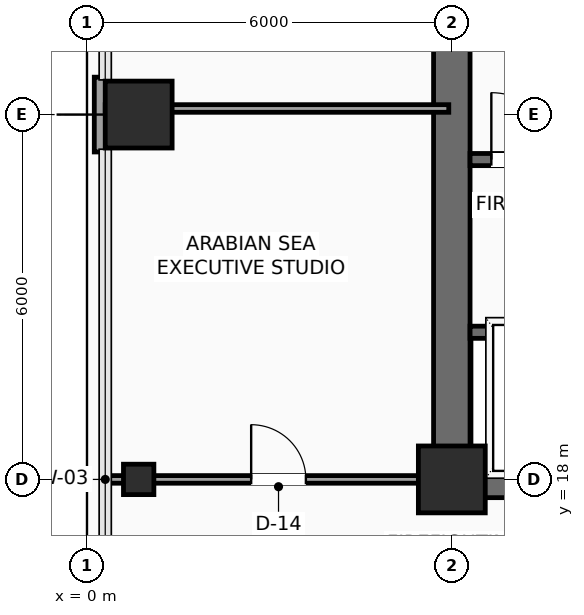
"""IFC4 building model, lengths in metres.
Left out: names, types, materials, properties, quantities, classifications, styles, units other than length and angle.
Written with IfcOpenShell. Run it as: python <this file> out.ifc"""

import sys

from ifc_helpers import new_model, si_unit, direction, frame, frame_2d, origin, origin_2d, place, context, subcontext, project, spatial, rectangle, hollow_rectangle, extrude, element, fill, save


model = new_model("IFC4")
c1 = context("Model", 3, precision=1e-05, world=origin(), true_north=direction((0.0, 1.0)))
c2 = subcontext(c1, "Body", "Model", "MODEL_VIEW")
j1 = project(units=[si_unit("LENGTHUNIT", "METRE"), si_unit("PLANEANGLEUNIT", "RADIAN")], contexts=[c1])
p1 = place(None, origin())
s1 = spatial("IfcSite", under=j1, at=p1, CompositionType="ELEMENT")
p2 = place(p1, origin())
s2 = spatial("IfcBuilding", under=s1, at=p2, CompositionType="ELEMENT")
p3 = place(p2, frame((0.0, 0.0, 153.15)))
s3 = spatial("IfcBuildingStorey", under=s2, at=p3, CompositionType="ELEMENT", Elevation=153.15)
p4 = place(p3, frame((6.0, 18.0, 0.0), z_axis=(0.0, 0.0, 1.0), x_axis=(1.0, 0.0, 0.0)))
e1 = element("IfcColumn", 1, at=p4, inside=s3, PredefinedType="COLUMN", context=c2, shape_type="SweptSolid", body=[
    extrude(rectangle(XDim=1.1, YDim=1.1, at=origin_2d()), origin(), (0.0, 0.0, 1.0), 3.75),
])
p5 = place(p3, frame((0.85, 18.0, 0.0), z_axis=(0.0, 0.0, 1.0), x_axis=(1.0, 0.0, 0.0)))
e2 = element("IfcColumn", 2, at=p5, inside=s3, PredefinedType="COLUMN", context=c2, shape_type="SweptSolid", body=[
    extrude(hollow_rectangle(XDim=0.5, YDim=0.5, WallThickness=0.025, InnerFilletRadius=0.025, OuterFilletRadius=0.04, at=origin_2d()), origin(), (0.0, 0.0, 1.0), 3.75),
])
p6 = place(p3, frame((0.85, 24.0, 0.0), z_axis=(0.0, 0.0, 1.0), x_axis=(1.0, 0.0, 0.0)))
e3 = element("IfcColumn", 3, at=p6, inside=s3, PredefinedType="COLUMN", context=c2, shape_type="SweptSolid", body=[
    extrude(rectangle(XDim=1.1, YDim=1.1, at=origin_2d()), origin(), (0.0, 0.0, 1.0), 3.75),
])
p7 = place(p3, frame((0.24, 23.385, 0.0), z_axis=(0.0, 0.0, 1.0), x_axis=(0.0, 1.0, 0.0)))
e4 = element("IfcWall", 4, at=p7, inside=s3, PredefinedType="SOLIDWALL", context=c2, shape_type="SweptSolid", body=[
    extrude(rectangle(XDim=1.23, YDim=0.24, at=frame_2d((0.615, 0.0))), origin(), (0.0, 0.0, 1.0), 3.525),
])
p8 = place(p3, frame((6.0, 18.0, 0.0), z_axis=(0.0, 0.0, 1.0), x_axis=(1.0, 0.0, 0.0)))
e5 = element("IfcWall", 5, at=p8, inside=s3, PredefinedType="SHEAR", context=c2, shape_type="SweptSolid", body=[
    extrude(rectangle(XDim=12.0, YDim=0.6, at=frame_2d((6.0, 0.0))), origin(), (0.0, 0.0, 1.0), 3.525),
])
p9 = place(p8, frame((7.15, 0.0, 0.0)))
e6 = element("IfcOpeningElement", 6, at=p9, cuts=e5, PredefinedType="OPENING", context=c2, shape_type="SweptSolid", body=[
    extrude(rectangle(XDim=1.6, YDim=2.3, at=frame_2d((0.8, 1.15))), frame((0.0, 0.31, 0.0), z_axis=(0.0, -1.0, 0.0), x_axis=(1.0, 0.0, 0.0)), (0.0, 0.0, 1.0), 0.62),
])
p10 = place(p3, frame((6.0, 18.0, 0.0), z_axis=(0.0, 0.0, 1.0), x_axis=(0.0, 1.0, 0.0)))
e7 = element("IfcWall", 7, at=p10, inside=s3, PredefinedType="SHEAR", context=c2, shape_type="SweptSolid", body=[
    extrude(rectangle(XDim=9.6, YDim=0.6, at=frame_2d((4.8, 0.0))), origin(), (0.0, 0.0, 1.0), 3.525),
])
p11 = place(p3, frame((6.3, 23.26, 0.0), z_axis=(0.0, 0.0, 1.0), x_axis=(1.0, 0.0, 0.0)))
e8 = element("IfcWall", 8, at=p11, inside=s3, PredefinedType="SHEAR", context=c2, shape_type="SweptSolid", body=[
    extrude(rectangle(XDim=8.88, YDim=0.2, at=frame_2d((4.44, 0.0))), origin(), (0.0, 0.0, 1.0), 3.525),
])
p12 = place(p11, frame((0.35, 0.0, 0.0)))
e9 = element("IfcOpeningElement", 9, at=p12, cuts=e8, PredefinedType="OPENING", context=c2, shape_type="SweptSolid", body=[
    extrude(rectangle(XDim=1.1, YDim=2.2, at=frame_2d((0.55, 1.1))), frame((0.0, 0.11, 0.0), z_axis=(0.0, -1.0, 0.0), x_axis=(1.0, 0.0, 0.0)), (0.0, 0.0, 1.0), 0.22),
])
p13 = place(p3, frame((6.3, 20.42, 0.0), z_axis=(0.0, 0.0, 1.0), x_axis=(1.0, 0.0, 0.0)))
e10 = element("IfcWall", 10, at=p13, inside=s3, PredefinedType="SHEAR", context=c2, shape_type="SweptSolid", body=[
    extrude(rectangle(XDim=4.95, YDim=0.2, at=frame_2d((2.475, 0.0))), origin(), (0.0, 0.0, 1.0), 3.525),
])
p14 = place(p13, frame((0.65, 0.0, 0.0)))
e11 = element("IfcOpeningElement", 11, at=p14, cuts=e10, PredefinedType="OPENING", context=c2, shape_type="SweptSolid", body=[
    extrude(rectangle(XDim=1.1, YDim=2.2, at=frame_2d((0.55, 1.1))), frame((0.0, 0.11, 0.0), z_axis=(0.0, -1.0, 0.0), x_axis=(1.0, 0.0, 0.0)), (0.0, 0.0, 1.0), 0.22),
])
p15 = place(p13, frame((3.05, 0.0, 0.0)))
e12 = element("IfcOpeningElement", 12, at=p15, cuts=e10, PredefinedType="OPENING", context=c2, shape_type="SweptSolid", body=[
    extrude(rectangle(XDim=1.1, YDim=2.2, at=frame_2d((0.55, 1.1))), frame((0.0, 0.11, 0.0), z_axis=(0.0, -1.0, 0.0), x_axis=(1.0, 0.0, 0.0)), (0.0, 0.0, 1.0), 0.22),
])
p16 = place(p3, frame((0.3, 18.0, 0.0), z_axis=(0.0, 0.0, 1.0), x_axis=(1.0, 0.0, 0.0)))
e13 = element("IfcWall", 13, at=p16, inside=s3, PredefinedType="PARTITIONING", context=c2, shape_type="SweptSolid", body=[
    extrude(rectangle(XDim=5.65, YDim=0.125, at=frame_2d((2.825, 0.0))), origin(), (0.0, 0.0, 1.0), 3.017),
])
p17 = place(p16, frame((2.4, 0.0, 0.0)))
e14 = element("IfcOpeningElement", 14, at=p17, cuts=e13, PredefinedType="OPENING", context=c2, shape_type="SweptSolid", body=[
    extrude(rectangle(XDim=0.9, YDim=2.1, at=frame_2d((0.45, 1.05))), frame((0.0, 0.073, 0.0), z_axis=(0.0, -1.0, 0.0), x_axis=(1.0, 0.0, 0.0)), (0.0, 0.0, 1.0), 0.145),
])
p18 = place(p3, frame((0.3, 24.1, 0.0), z_axis=(0.0, 0.0, 1.0), x_axis=(1.0, 0.0, 0.0)))
e15 = element("IfcWall", 15, at=p18, inside=s3, PredefinedType="PARTITIONING", context=c2, shape_type="SweptSolid", body=[
    extrude(rectangle(XDim=5.65, YDim=0.125, at=frame_2d((2.825, 0.0))), origin(), (0.0, 0.0, 1.0), 3.525),
])
p19 = place(p12, origin())
e16 = element("IfcDoor", 16, at=p19, inside=s3, OperationType="SINGLE_SWING_LEFT", PredefinedType="DOOR", context=c2, shape_type="SweptSolid", body=[
    extrude(rectangle(XDim=1.1, YDim=2.2, at=frame_2d((0.55, 1.1))), frame((0.0, 0.025, 0.0), z_axis=(0.0, -1.0, 0.0), x_axis=(1.0, 0.0, 0.0)), (0.0, 0.0, 1.0), 0.05),
])
fill(e9, e16)
p20 = place(p17, origin())
e17 = element("IfcDoor", 17, at=p20, inside=s3, OperationType="SINGLE_SWING_LEFT", PredefinedType="DOOR", context=c2, shape_type="SweptSolid", body=[
    extrude(rectangle(XDim=0.9, YDim=2.1, at=frame_2d((0.45, 1.05))), frame((0.0, 0.025, 0.0), z_axis=(0.0, -1.0, 0.0), x_axis=(1.0, 0.0, 0.0)), (0.0, 0.0, 1.0), 0.05),
])
fill(e14, e17)
save(model, sys.argv[1])
